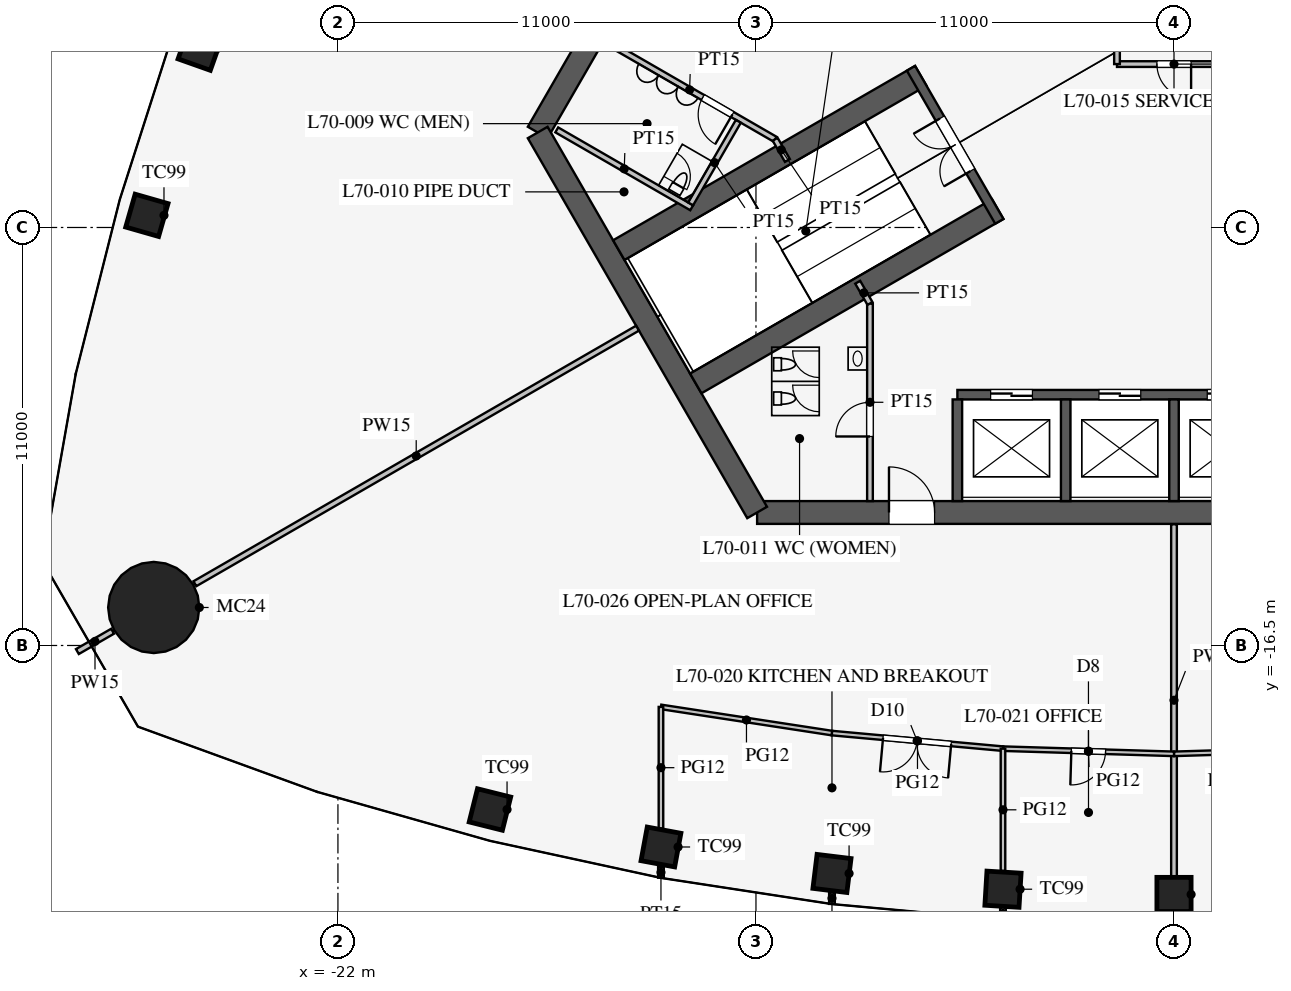
"""IFC4 building model, lengths in metres.
Left out: names, types, materials, properties, quantities, classifications, styles, units other than length and angle.
Written with IfcOpenShell. Run it as: python <this file> out.ifc"""

import sys

from ifc_helpers import new_model, si_unit, direction, frame, frame_2d, origin, origin_2d, place, context, subcontext, project, spatial, rectangle, circle, extrude, element, fill, save


model = new_model("IFC4")
c1 = context("Model", 3, precision=1e-05, world=origin(), true_north=direction((0.0, 1.0)))
c2 = subcontext(c1, "Body", "Model", "MODEL_VIEW")
j1 = project(units=[si_unit("LENGTHUNIT", "METRE"), si_unit("PLANEANGLEUNIT", "RADIAN")], contexts=[c1])
p1 = place(None, origin())
s1 = spatial("IfcSite", under=j1, at=p1, CompositionType="ELEMENT")
p2 = place(p1, origin())
s2 = spatial("IfcBuilding", under=s1, at=p2, CompositionType="ELEMENT")
p3 = place(p2, frame((0.0, 0.0, 305.7)))
s3 = spatial("IfcBuildingStorey", under=s2, at=p3, CompositionType="ELEMENT", Elevation=305.7)
for number, where, z_axis, x_axis in (
    (1, (-18.0, -20.816, 0.0), (0.0, 0.0, 1.0), (0.97, -0.242, 0.0)),
    (2, (-13.5, -21.803, 0.0), (0.0, 0.0, 1.0), (0.983, -0.182, 0.0)),
    (3, (-9.0, -22.499, 0.0), (0.0, 0.0, 1.0), (0.993, -0.121, 0.0)),
    (4, (-4.5, -22.914, 0.0), (0.0, 0.0, 1.0), (0.998, -0.061, 0.0)),
    (5, (0.0, -23.052, 0.0), (0.0, 0.0, 1.0), (1.0, 0.0, 0.0)),
    (6, (-25.632, -0.79, 0.0), (0.0, 0.0, 1.0), (-0.334, -0.942, 0.0)),
    (7, (-27.027, -5.18, 0.0), (0.0, 0.0, 1.0), (-0.275, -0.961, 0.0)),
):
    element("IfcColumn", number, at=place(p3, frame(where, z_axis=z_axis, x_axis=x_axis)), inside=s3, PredefinedType="COLUMN", context=c2, shape_type="SweptSolid", body=[
        extrude(rectangle(XDim=0.9, YDim=0.9, at=origin_2d()), origin(), (0.0, 0.0, 1.0), 4.2),
    ])
p4 = place(p3, frame((-26.847, -15.5, 0.0), z_axis=(0.0, 0.0, 1.0), x_axis=(1.0, 0.0, 0.0)))
e8 = element("IfcColumn", 8, at=p4, inside=s3, PredefinedType="COLUMN", context=c2, shape_type="SweptSolid", body=[
    extrude(circle(Radius=1.2, at=origin_2d()), origin(), (0.0, 0.0, 1.0), 4.2),
])
p5 = place(p3, frame((-10.97, -13.0, 0.0), z_axis=(0.0, 0.0, 1.0), x_axis=(1.0, 0.0, 0.0)))
e9 = element("IfcWall", 9, at=p5, inside=s3, PredefinedType="SHEAR", context=c2, shape_type="SweptSolid", body=[
    extrude(rectangle(XDim=21.939, YDim=0.6, at=frame_2d((10.97, 0.0))), origin(), (0.0, 0.0, 1.0), 4.2),
])
p6 = place(p5, frame((17.27, 0.0, 0.0)))
e10 = element("IfcOpeningElement", 10, at=p6, cuts=e9, PredefinedType="OPENING", context=c2, shape_type="SweptSolid", body=[
    extrude(rectangle(XDim=1.2, YDim=2.1, at=frame_2d((0.6, 1.05))), frame((0.0, 0.31, 0.0), z_axis=(0.0, -1.0, 0.0), x_axis=(1.0, 0.0, 0.0)), (0.0, 0.0, 1.0), 0.62),
])
p7 = place(p5, frame((3.47, 0.0, 0.0)))
e11 = element("IfcOpeningElement", 11, at=p7, cuts=e9, PredefinedType="OPENING", context=c2, shape_type="SweptSolid", body=[
    extrude(rectangle(XDim=1.2, YDim=2.1, at=frame_2d((0.6, 1.05))), frame((0.0, 0.31, 0.0), z_axis=(0.0, -1.0, 0.0), x_axis=(1.0, 0.0, 0.0)), (0.0, 0.0, 1.0), 0.62),
])
p8 = place(p3, frame((-5.773, 16.0, 0.0), z_axis=(0.0, 0.0, 1.0), x_axis=(-0.500002442456, -0.866023993627, 0.0)))
e12 = element("IfcWall", 12, at=p8, inside=s3, PredefinedType="SHEAR", context=c2, shape_type="SweptSolid", body=[
    extrude(rectangle(XDim=21.939, YDim=0.6, at=frame_2d((10.97, 0.0))), origin(), (0.0, 0.0, 1.0), 4.2),
])
p9 = place(p8, frame((17.27, 0.0, 0.0)))
e13 = element("IfcOpeningElement", 13, at=p9, cuts=e12, PredefinedType="OPENING", context=c2, shape_type="SweptSolid", body=[
    extrude(rectangle(XDim=1.2, YDim=2.1, at=frame_2d((0.6, 1.05))), frame((0.0, 0.31, 0.0), z_axis=(0.0, -1.0, 0.0), x_axis=(1.0, 0.0, 0.0)), (0.0, 0.0, 1.0), 0.62),
])
p10 = place(p8, frame((3.47, 0.0, 0.0)))
e14 = element("IfcOpeningElement", 14, at=p10, cuts=e12, PredefinedType="OPENING", context=c2, shape_type="SweptSolid", body=[
    extrude(rectangle(XDim=1.2, YDim=2.1, at=frame_2d((0.6, 1.05))), frame((0.0, 0.31, 0.0), z_axis=(0.0, -1.0, 0.0), x_axis=(1.0, 0.0, 0.0)), (0.0, 0.0, 1.0), 0.62),
])
p11 = place(p3, frame((-16.743, -3.0, 0.0), z_axis=(0.0, 0.0, 1.0), x_axis=(0.499995765644, -0.866027848477, 0.0)))
e15 = element("IfcWall", 15, at=p11, inside=s3, PredefinedType="SHEAR", context=c2, shape_type="SweptSolid", body=[
    extrude(rectangle(XDim=11.547, YDim=0.6, at=frame_2d((5.773, 0.0))), origin(), (0.0, 0.0, 1.0), 4.2),
])
p12 = place(p3, frame((-5.7, -9.9, 0.0), z_axis=(0.0, 0.0, 1.0), x_axis=(1.0, 0.0, 0.0)))
e16 = element("IfcWall", 16, at=p12, inside=s3, PredefinedType="SHEAR", context=c2, shape_type="SweptSolid", body=[
    extrude(rectangle(XDim=11.4, YDim=0.25, at=frame_2d((5.7, 0.0))), origin(), (0.0, 0.0, 1.0), 4.2),
])
p13 = place(p12, frame((0.875, 0.0, 0.0)))
e17 = element("IfcOpeningElement", 17, at=p13, cuts=e16, PredefinedType="OPENING", context=c2, shape_type="SweptSolid", body=[
    extrude(rectangle(XDim=1.1, YDim=2.2, at=frame_2d((0.55, 1.1))), frame((0.0, 0.135, 0.0), z_axis=(0.0, -1.0, 0.0), x_axis=(1.0, 0.0, 0.0)), (0.0, 0.0, 1.0), 0.27),
])
p14 = place(p12, frame((3.725, 0.0, 0.0)))
e18 = element("IfcOpeningElement", 18, at=p14, cuts=e16, PredefinedType="OPENING", context=c2, shape_type="SweptSolid", body=[
    extrude(rectangle(XDim=1.1, YDim=2.2, at=frame_2d((0.55, 1.1))), frame((0.0, 0.135, 0.0), z_axis=(0.0, -1.0, 0.0), x_axis=(1.0, 0.0, 0.0)), (0.0, 0.0, 1.0), 0.27),
])
p15 = place(p12, frame((6.575, 0.0, 0.0)))
e19 = element("IfcOpeningElement", 19, at=p15, cuts=e16, PredefinedType="OPENING", context=c2, shape_type="SweptSolid", body=[
    extrude(rectangle(XDim=1.1, YDim=2.2, at=frame_2d((0.55, 1.1))), frame((0.0, 0.135, 0.0), z_axis=(0.0, -1.0, 0.0), x_axis=(1.0, 0.0, 0.0)), (0.0, 0.0, 1.0), 0.27),
])
p16 = place(p12, frame((9.425, 0.0, 0.0)))
e20 = element("IfcOpeningElement", 20, at=p16, cuts=e16, PredefinedType="OPENING", context=c2, shape_type="SweptSolid", body=[
    extrude(rectangle(XDim=1.1, YDim=2.2, at=frame_2d((0.55, 1.1))), frame((0.0, 0.135, 0.0), z_axis=(0.0, -1.0, 0.0), x_axis=(1.0, 0.0, 0.0)), (0.0, 0.0, 1.0), 0.27),
])
for number, where, z_axis, x_axis in (
    (21, (-5.7, -10.025, 0.0), (0.0, 0.0, 1.0), (0.0, -1.0, 0.0)),
    (22, (-2.85, -10.025, 0.0), (0.0, 0.0, 1.0), (0.0, -1.0, 0.0)),
    (23, (0.0, -10.025, 0.0), (0.0, 0.0, 1.0), (0.0, -1.0, 0.0)),
):
    element("IfcWall", number, at=place(p3, frame(where, z_axis=z_axis, x_axis=x_axis)), inside=s3, PredefinedType="SHEAR", context=c2, shape_type="SweptSolid", body=[
        extrude(rectangle(XDim=2.675, YDim=0.25, at=frame_2d((1.337, 0.0))), origin(), (0.0, 0.0, 1.0), 4.2),
    ])
p17 = place(p3, frame((-6.663, -1.509, 0.0), z_axis=(0.0, 0.0, 1.0), x_axis=(-0.86603049496, -0.499991181721, 0.0)))
e24 = element("IfcWall", 24, at=p17, inside=s3, PredefinedType="SHEAR", context=c2, shape_type="SweptSolid", body=[
    extrude(rectangle(XDim=9.175, YDim=0.6, at=frame_2d((4.587, 0.0))), origin(), (0.0, 0.0, 1.0), 4.2),
])
p18 = place(p3, frame((-4.638, -5.016, 0.0), z_axis=(0.0, 0.0, 1.0), x_axis=(-0.866012320003, -0.50002266109, 0.0)))
e25 = element("IfcWall", 25, at=p18, inside=s3, PredefinedType="SHEAR", context=c2, shape_type="SweptSolid", body=[
    extrude(rectangle(XDim=9.175, YDim=0.6, at=frame_2d((4.587, 0.0))), origin(), (0.0, 0.0, 1.0), 4.2),
])
p19 = place(p3, frame((-6.922, -1.312, 0.0), z_axis=(0.0, 0.0, 1.0), x_axis=(0.499984536904, -0.866034331223, 0.0)))
e26 = element("IfcWall", 26, at=p19, inside=s3, PredefinedType="SHEAR", context=c2, shape_type="SweptSolid", body=[
    extrude(rectangle(XDim=4.65, YDim=0.25, at=frame_2d((2.325, 0.0))), origin(), (0.0, 0.0, 1.0), 4.2),
])
p20 = place(p19, frame((1.525, 0.0, 0.0)))
e27 = element("IfcOpeningElement", 27, at=p20, cuts=e26, PredefinedType="OPENING", context=c2, shape_type="SweptSolid", body=[
    extrude(rectangle(XDim=1.6, YDim=2.1, at=frame_2d((0.8, 1.05))), frame((0.0, 0.135, 0.0), z_axis=(0.0, -1.0, 0.0), x_axis=(1.0, 0.0, 0.0)), (0.0, 0.0, 1.0), 0.27),
])
p21 = place(p3, frame((-8.0, -7.5, 0.0), z_axis=(0.0, 0.0, 1.0), x_axis=(0.0, -1.0, 0.0)))
e28 = element("IfcWall", 28, at=p21, inside=s3, PredefinedType="PARTITIONING", context=c2, shape_type="SweptSolid", body=[
    extrude(rectangle(XDim=5.2, YDim=0.15, at=frame_2d((2.6, 0.0))), origin(), (0.0, 0.0, 1.0), 4.0),
])
p22 = place(p21, frame((2.6, 0.0, 0.0)))
e29 = element("IfcOpeningElement", 29, at=p22, cuts=e28, PredefinedType="OPENING", context=c2, shape_type="SweptSolid", body=[
    extrude(rectangle(XDim=0.9, YDim=2.1, at=frame_2d((0.45, 1.05))), frame((0.0, 0.085, 0.0), z_axis=(0.0, -1.0, 0.0), x_axis=(1.0, 0.0, 0.0)), (0.0, 0.0, 1.0), 0.17),
])
p23 = place(p3, frame((-10.495, -3.178, 0.0), z_axis=(0.0, 0.0, 1.0), x_axis=(-0.866021400173, 0.500006934395, 0.0)))
e30 = element("IfcWall", 30, at=p23, inside=s3, PredefinedType="PARTITIONING", context=c2, shape_type="SweptSolid", body=[
    extrude(rectangle(XDim=5.2, YDim=0.15, at=frame_2d((2.6, 0.0))), origin(), (0.0, 0.0, 1.0), 4.0),
])
p24 = place(p23, frame((1.3, 0.0, 0.0)))
e31 = element("IfcOpeningElement", 31, at=p24, cuts=e30, PredefinedType="OPENING", context=c2, shape_type="SweptSolid", body=[
    extrude(rectangle(XDim=0.9, YDim=2.1, at=frame_2d((0.45, 1.05))), frame((0.0, 0.085, 0.0), z_axis=(0.0, -1.0, 0.0), x_axis=(1.0, 0.0, 0.0)), (0.0, 0.0, 1.0), 0.17),
])
for number, where, z_axis, x_axis in (
    (32, (-10.495, -3.178, 0.0), (0.0, 0.0, 1.0), (0.5, -0.866, 0.0)),
    (33, (-8.0, -7.5, 0.0), (0.0, 0.0, 1.0), (-0.5, 0.866, 0.0)),
):
    element("IfcWall", number, at=place(p3, frame(where, z_axis=z_axis, x_axis=x_axis)), inside=s3, PredefinedType="PARTITIONING", context=c2, shape_type="SweptSolid", body=[
        extrude(rectangle(XDim=0.645, YDim=0.15, at=frame_2d((0.323, 0.0))), origin(), (0.0, 0.0, 1.0), 4.0),
    ])
p25 = place(p3, frame((-12.691, -4.982, 0.0), z_axis=(0.0, 0.0, 1.0), x_axis=(-0.8660249478, 0.500000789788, 0.0)))
e34 = element("IfcWall", 34, at=p25, inside=s3, PredefinedType="PARTITIONING", context=c2, shape_type="SweptSolid", body=[
    extrude(rectangle(XDim=4.1, YDim=0.15, at=frame_2d((2.05, 0.0))), origin(), (0.0, 0.0, 1.0), 4.0),
])
p26 = place(p3, frame((-11.464, -2.706, 0.0), z_axis=(0.0, 0.0, 1.0), x_axis=(-0.50001992892, -0.866013897511, 0.0)))
e35 = element("IfcWall", 35, at=p26, inside=s3, PredefinedType="PARTITIONING", context=c2, shape_type="SweptSolid", body=[
    extrude(rectangle(XDim=2.51, YDim=0.15, at=frame_2d((1.255, 0.0))), origin(), (0.0, 0.0, 1.0), 4.0),
])
p27 = place(p3, frame((-1.5, -1.2, 0.0), z_axis=(0.0, 0.0, 1.0), x_axis=(1.0, 0.0, 0.0)))
e36 = element("IfcWall", 36, at=p27, inside=s3, PredefinedType="PARTITIONING", context=c2, shape_type="SweptSolid", body=[
    extrude(rectangle(XDim=3.0, YDim=0.15, at=frame_2d((1.5, 0.0))), origin(), (0.0, 0.0, 1.0), 4.0),
])
p28 = place(p27, frame((1.05, 0.0, 0.0)))
e37 = element("IfcOpeningElement", 37, at=p28, cuts=e36, PredefinedType="OPENING", context=c2, shape_type="SweptSolid", body=[
    extrude(rectangle(XDim=0.9, YDim=2.1, at=frame_2d((0.45, 1.05))), frame((0.0, 0.085, 0.0), z_axis=(0.0, -1.0, 0.0), x_axis=(1.0, 0.0, 0.0)), (0.0, 0.0, 1.0), 0.17),
])
p29 = place(p3, frame((-1.5, 1.2, 0.0), z_axis=(0.0, 0.0, 1.0), x_axis=(0.0, -1.0, 0.0)))
e38 = element("IfcWall", 38, at=p29, inside=s3, PredefinedType="PARTITIONING", context=c2, shape_type="SweptSolid", body=[
    extrude(rectangle(XDim=2.4, YDim=0.15, at=frame_2d((1.2, 0.0))), origin(), (0.0, 0.0, 1.0), 4.0),
])
p30 = place(p3, frame((-14.116, -8.15, 0.0), z_axis=(0.0, 0.0, 1.0), x_axis=(-0.866020541135, -0.500008422262, 0.0)))
e39 = element("IfcWall", 39, at=p30, inside=s3, PredefinedType="PARTITIONING", context=c2, shape_type="SweptSolid", body=[
    extrude(rectangle(XDim=13.45, YDim=0.15, at=frame_2d((6.725, 0.0))), origin(), (0.0, 0.0, 1.0), 2.5),
])
p31 = place(p3, frame((-27.929, -16.125, 0.0), z_axis=(0.0, 0.0, 1.0), x_axis=(-0.866086810508, -0.499893625349, 0.0)))
e40 = element("IfcWall", 40, at=p31, inside=s3, PredefinedType="PARTITIONING", context=c2, shape_type="SweptSolid", body=[
    extrude(rectangle(XDim=1.07, YDim=0.15, at=frame_2d((0.535, 0.0))), origin(), (0.0, 0.0, 1.0), 2.5),
])
p32 = place(p3, frame((0.0, -13.31, 0.0), z_axis=(0.0, 0.0, 1.0), x_axis=(0.0, -1.0, 0.0)))
e41 = element("IfcWall", 41, at=p32, inside=s3, PredefinedType="PARTITIONING", context=c2, shape_type="SweptSolid", body=[
    extrude(rectangle(XDim=9.261, YDim=0.15, at=frame_2d((4.631, 0.0))), origin(), (0.0, 0.0, 1.0), 3.3),
])
p33 = place(p3, frame((-13.5, -22.331, 0.0), z_axis=(0.0, 0.0, 1.0), x_axis=(0.0, -1.0, 0.0)))
e42 = element("IfcWall", 42, at=p33, inside=s3, PredefinedType="PARTITIONING", context=c2, shape_type="SweptSolid", body=[
    extrude(rectangle(XDim=0.28, YDim=0.15, at=frame_2d((0.14, 0.0))), origin(), (0.0, 0.0, 1.0), 2.9),
])
p34 = place(p3, frame((-4.5, -23.394, 0.0), z_axis=(0.0, 0.0, 1.0), x_axis=(0.0, -1.0, 0.0)))
e43 = element("IfcWall", 43, at=p34, inside=s3, PredefinedType="PARTITIONING", context=c2, shape_type="SweptSolid", body=[
    extrude(rectangle(XDim=0.316, YDim=0.15, at=frame_2d((0.158, 0.0))), origin(), (0.0, 0.0, 1.0), 2.9),
])
p35 = place(p3, frame((-9.0, -23.004, 0.0), z_axis=(0.0, 0.0, 1.0), x_axis=(0.0, -1.0, 0.0)))
e44 = element("IfcWall", 44, at=p35, inside=s3, PredefinedType="PARTITIONING", context=c2, shape_type="SweptSolid", body=[
    extrude(rectangle(XDim=0.296, YDim=0.15, at=frame_2d((0.148, 0.0))), origin(), (0.0, 0.0, 1.0), 2.9),
])
p36 = place(p3, frame((0.0, -19.352, 0.0), z_axis=(0.0, 0.0, 1.0), x_axis=(0.999542074227, 0.030259574513, 0.0)))
e45 = element("IfcWall", 45, at=p36, inside=s3, PredefinedType="PARTITIONING", context=c2, shape_type="SweptSolid", body=[
    extrude(rectangle(XDim=4.502, YDim=0.12, at=frame_2d((2.251, 0.0))), origin(), (0.0, 0.0, 1.0), 2.9),
])
p37 = place(p36, frame((1.8, 0.0, 0.15)))
e46 = element("IfcOpeningElement", 46, at=p37, cuts=e45, PredefinedType="OPENING", context=c2, shape_type="SweptSolid", body=[
    extrude(rectangle(XDim=0.9, YDim=2.1, at=frame_2d((0.45, 1.05))), frame((0.0, 0.07, 0.0), z_axis=(0.0, -1.0, 0.0), x_axis=(1.0, 0.0, 0.0)), (0.0, 0.0, 1.0), 0.14),
])
p38 = place(p3, frame((-13.5, -18.116, 0.0), z_axis=(0.0, 0.0, 1.0), x_axis=(0.988481794406, -0.151339823341, 0.0)))
e47 = element("IfcWall", 47, at=p38, inside=s3, PredefinedType="PARTITIONING", context=c2, shape_type="SweptSolid", body=[
    extrude(rectangle(XDim=4.552, YDim=0.12, at=frame_2d((2.276, 0.0))), origin(), (0.0, 0.0, 1.0), 2.9),
])
p39 = place(p3, frame((-4.5, -19.215, 0.0), z_axis=(0.0, 0.0, 1.0), x_axis=(0.999542074227, -0.030259574513, 0.0)))
e48 = element("IfcWall", 48, at=p39, inside=s3, PredefinedType="PARTITIONING", context=c2, shape_type="SweptSolid", body=[
    extrude(rectangle(XDim=4.502, YDim=0.12, at=frame_2d((2.251, 0.0))), origin(), (0.0, 0.0, 1.0), 2.9),
])
p40 = place(p39, frame((1.8, 0.0, 0.15)))
e49 = element("IfcOpeningElement", 49, at=p40, cuts=e48, PredefinedType="OPENING", context=c2, shape_type="SweptSolid", body=[
    extrude(rectangle(XDim=0.9, YDim=2.1, at=frame_2d((0.45, 1.05))), frame((0.0, 0.07, 0.0), z_axis=(0.0, -1.0, 0.0), x_axis=(1.0, 0.0, 0.0)), (0.0, 0.0, 1.0), 0.14),
])
p41 = place(p3, frame((-9.0, -18.805, 0.0), z_axis=(0.0, 0.0, 1.0), x_axis=(0.995871921504, -0.090769576179, 0.0)))
e50 = element("IfcWall", 50, at=p41, inside=s3, PredefinedType="PARTITIONING", context=c2, shape_type="SweptSolid", body=[
    extrude(rectangle(XDim=4.519, YDim=0.12, at=frame_2d((2.259, 0.0))), origin(), (0.0, 0.0, 1.0), 2.9),
])
p42 = place(p41, frame((1.35, 0.0, 0.15)))
e51 = element("IfcOpeningElement", 51, at=p42, cuts=e50, PredefinedType="OPENING", context=c2, shape_type="SweptSolid", body=[
    extrude(rectangle(XDim=1.8, YDim=2.1, at=frame_2d((0.9, 1.05))), frame((0.0, 0.07, 0.0), z_axis=(0.0, -1.0, 0.0), x_axis=(1.0, 0.0, 0.0)), (0.0, 0.0, 1.0), 0.14),
])
p43 = place(p3, frame((-13.5, -18.116, 0.0), z_axis=(0.0, 0.0, 1.0), x_axis=(0.0, -1.0, 0.0)))
e52 = element("IfcWall", 52, at=p43, inside=s3, PredefinedType="PARTITIONING", context=c2, shape_type="SweptSolid", body=[
    extrude(rectangle(XDim=3.198, YDim=0.12, at=frame_2d((1.599, 0.0))), origin(), (0.0, 0.0, 1.0), 2.9),
])
p44 = place(p3, frame((-4.5, -19.215, 0.0), z_axis=(0.0, 0.0, 1.0), x_axis=(0.0, -1.0, 0.0)))
e53 = element("IfcWall", 53, at=p44, inside=s3, PredefinedType="PARTITIONING", context=c2, shape_type="SweptSolid", body=[
    extrude(rectangle(XDim=3.218, YDim=0.12, at=frame_2d((1.609, 0.0))), origin(), (0.0, 0.0, 1.0), 2.9),
])
p45 = place(p22, frame((0.9, 0.0, 0.0), z_axis=(0.0, 0.0, 1.0), x_axis=(-1.0, 0.0, 0.0)))
e54 = element("IfcDoor", 54, at=p45, inside=s3, OperationType="SINGLE_SWING_LEFT", PredefinedType="DOOR", context=c2, shape_type="SweptSolid", body=[
    extrude(rectangle(XDim=0.9, YDim=2.1, at=frame_2d((0.45, 1.05))), frame((0.0, 0.025, 0.0), z_axis=(0.0, -1.0, 0.0), x_axis=(1.0, 0.0, 0.0)), (0.0, 0.0, 1.0), 0.05),
])
fill(e29, e54)
p46 = place(p24, origin())
e55 = element("IfcDoor", 55, at=p46, inside=s3, OperationType="SINGLE_SWING_LEFT", PredefinedType="DOOR", context=c2, shape_type="SweptSolid", body=[
    extrude(rectangle(XDim=0.9, YDim=2.1, at=frame_2d((0.45, 1.05))), frame((0.0, 0.025, 0.0), z_axis=(0.0, -1.0, 0.0), x_axis=(1.0, 0.0, 0.0)), (0.0, 0.0, 1.0), 0.05),
])
fill(e31, e55)
p47 = place(p28, frame((0.9, 0.0, 0.0), z_axis=(0.0, 0.0, 1.0), x_axis=(-1.0, 0.0, 0.0)))
e56 = element("IfcDoor", 56, at=p47, inside=s3, OperationType="SINGLE_SWING_LEFT", PredefinedType="DOOR", context=c2, shape_type="SweptSolid", body=[
    extrude(rectangle(XDim=0.9, YDim=2.1, at=frame_2d((0.45, 1.05))), frame((0.0, 0.025, 0.0), z_axis=(0.0, -1.0, 0.0), x_axis=(1.0, 0.0, 0.0)), (0.0, 0.0, 1.0), 0.05),
])
fill(e37, e56)
p48 = place(p20, frame((1.6, 0.0, 0.0), z_axis=(0.0, 0.0, 1.0), x_axis=(-1.0, 0.0, 0.0)))
e57 = element("IfcDoor", 57, at=p48, inside=s3, OperationType="DOUBLE_DOOR_SINGLE_SWING", PredefinedType="DOOR", context=c2, shape_type="SweptSolid", body=[
    extrude(rectangle(XDim=1.6, YDim=2.1, at=frame_2d((0.8, 1.05))), frame((0.0, 0.025, 0.0), z_axis=(0.0, -1.0, 0.0), x_axis=(1.0, 0.0, 0.0)), (0.0, 0.0, 1.0), 0.05),
])
fill(e27, e57)
p49 = place(p7, origin())
e58 = element("IfcDoor", 58, at=p49, inside=s3, OperationType="SINGLE_SWING_LEFT", PredefinedType="DOOR", context=c2, shape_type="SweptSolid", body=[
    extrude(rectangle(XDim=1.2, YDim=2.1, at=frame_2d((0.6, 1.05))), frame((0.0, 0.025, 0.0), z_axis=(0.0, -1.0, 0.0), x_axis=(1.0, 0.0, 0.0)), (0.0, 0.0, 1.0), 0.05),
])
fill(e11, e58)
p50 = place(p42, frame((1.8, 0.0, 0.0), z_axis=(0.0, 0.0, 1.0), x_axis=(-1.0, 0.0, 0.0)))
e59 = element("IfcDoor", 59, at=p50, inside=s3, OperationType="DOUBLE_DOOR_SINGLE_SWING", PredefinedType="DOOR", context=c2, shape_type="SweptSolid", body=[
    extrude(rectangle(XDim=1.8, YDim=2.1, at=frame_2d((0.9, 1.05))), frame((0.0, 0.025, 0.0), z_axis=(0.0, -1.0, 0.0), x_axis=(1.0, 0.0, 0.0)), (0.0, 0.0, 1.0), 0.05),
])
fill(e51, e59)
p51 = place(p40, frame((0.9, 0.0, 0.0), z_axis=(0.0, 0.0, 1.0), x_axis=(-1.0, 0.0, 0.0)))
e60 = element("IfcDoor", 60, at=p51, inside=s3, OperationType="SINGLE_SWING_RIGHT", PredefinedType="DOOR", context=c2, shape_type="SweptSolid", body=[
    extrude(rectangle(XDim=0.9, YDim=2.1, at=frame_2d((0.45, 1.05))), frame((0.0, 0.025, 0.0), z_axis=(0.0, -1.0, 0.0), x_axis=(1.0, 0.0, 0.0)), (0.0, 0.0, 1.0), 0.05),
])
fill(e49, e60)
p52 = place(p13, origin())
e61 = element("IfcDoor", 61, at=p52, inside=s3, OperationType="DOUBLE_DOOR_SLIDING", PredefinedType="DOOR", context=c2, shape_type="SweptSolid", body=[
    extrude(rectangle(XDim=1.1, YDim=2.2, at=frame_2d((0.55, 1.1))), frame((0.0, 0.025, 0.0), z_axis=(0.0, -1.0, 0.0), x_axis=(1.0, 0.0, 0.0)), (0.0, 0.0, 1.0), 0.05),
])
fill(e17, e61)
p53 = place(p14, origin())
e62 = element("IfcDoor", 62, at=p53, inside=s3, OperationType="DOUBLE_DOOR_SLIDING", PredefinedType="DOOR", context=c2, shape_type="SweptSolid", body=[
    extrude(rectangle(XDim=1.1, YDim=2.2, at=frame_2d((0.55, 1.1))), frame((0.0, 0.025, 0.0), z_axis=(0.0, -1.0, 0.0), x_axis=(1.0, 0.0, 0.0)), (0.0, 0.0, 1.0), 0.05),
])
fill(e18, e62)
p54 = place(p15, origin())
e63 = element("IfcDoor", 63, at=p54, inside=s3, OperationType="DOUBLE_DOOR_SLIDING", PredefinedType="DOOR", context=c2, shape_type="SweptSolid", body=[
    extrude(rectangle(XDim=1.1, YDim=2.2, at=frame_2d((0.55, 1.1))), frame((0.0, 0.025, 0.0), z_axis=(0.0, -1.0, 0.0), x_axis=(1.0, 0.0, 0.0)), (0.0, 0.0, 1.0), 0.05),
])
fill(e19, e63)
save(model, sys.argv[1])
